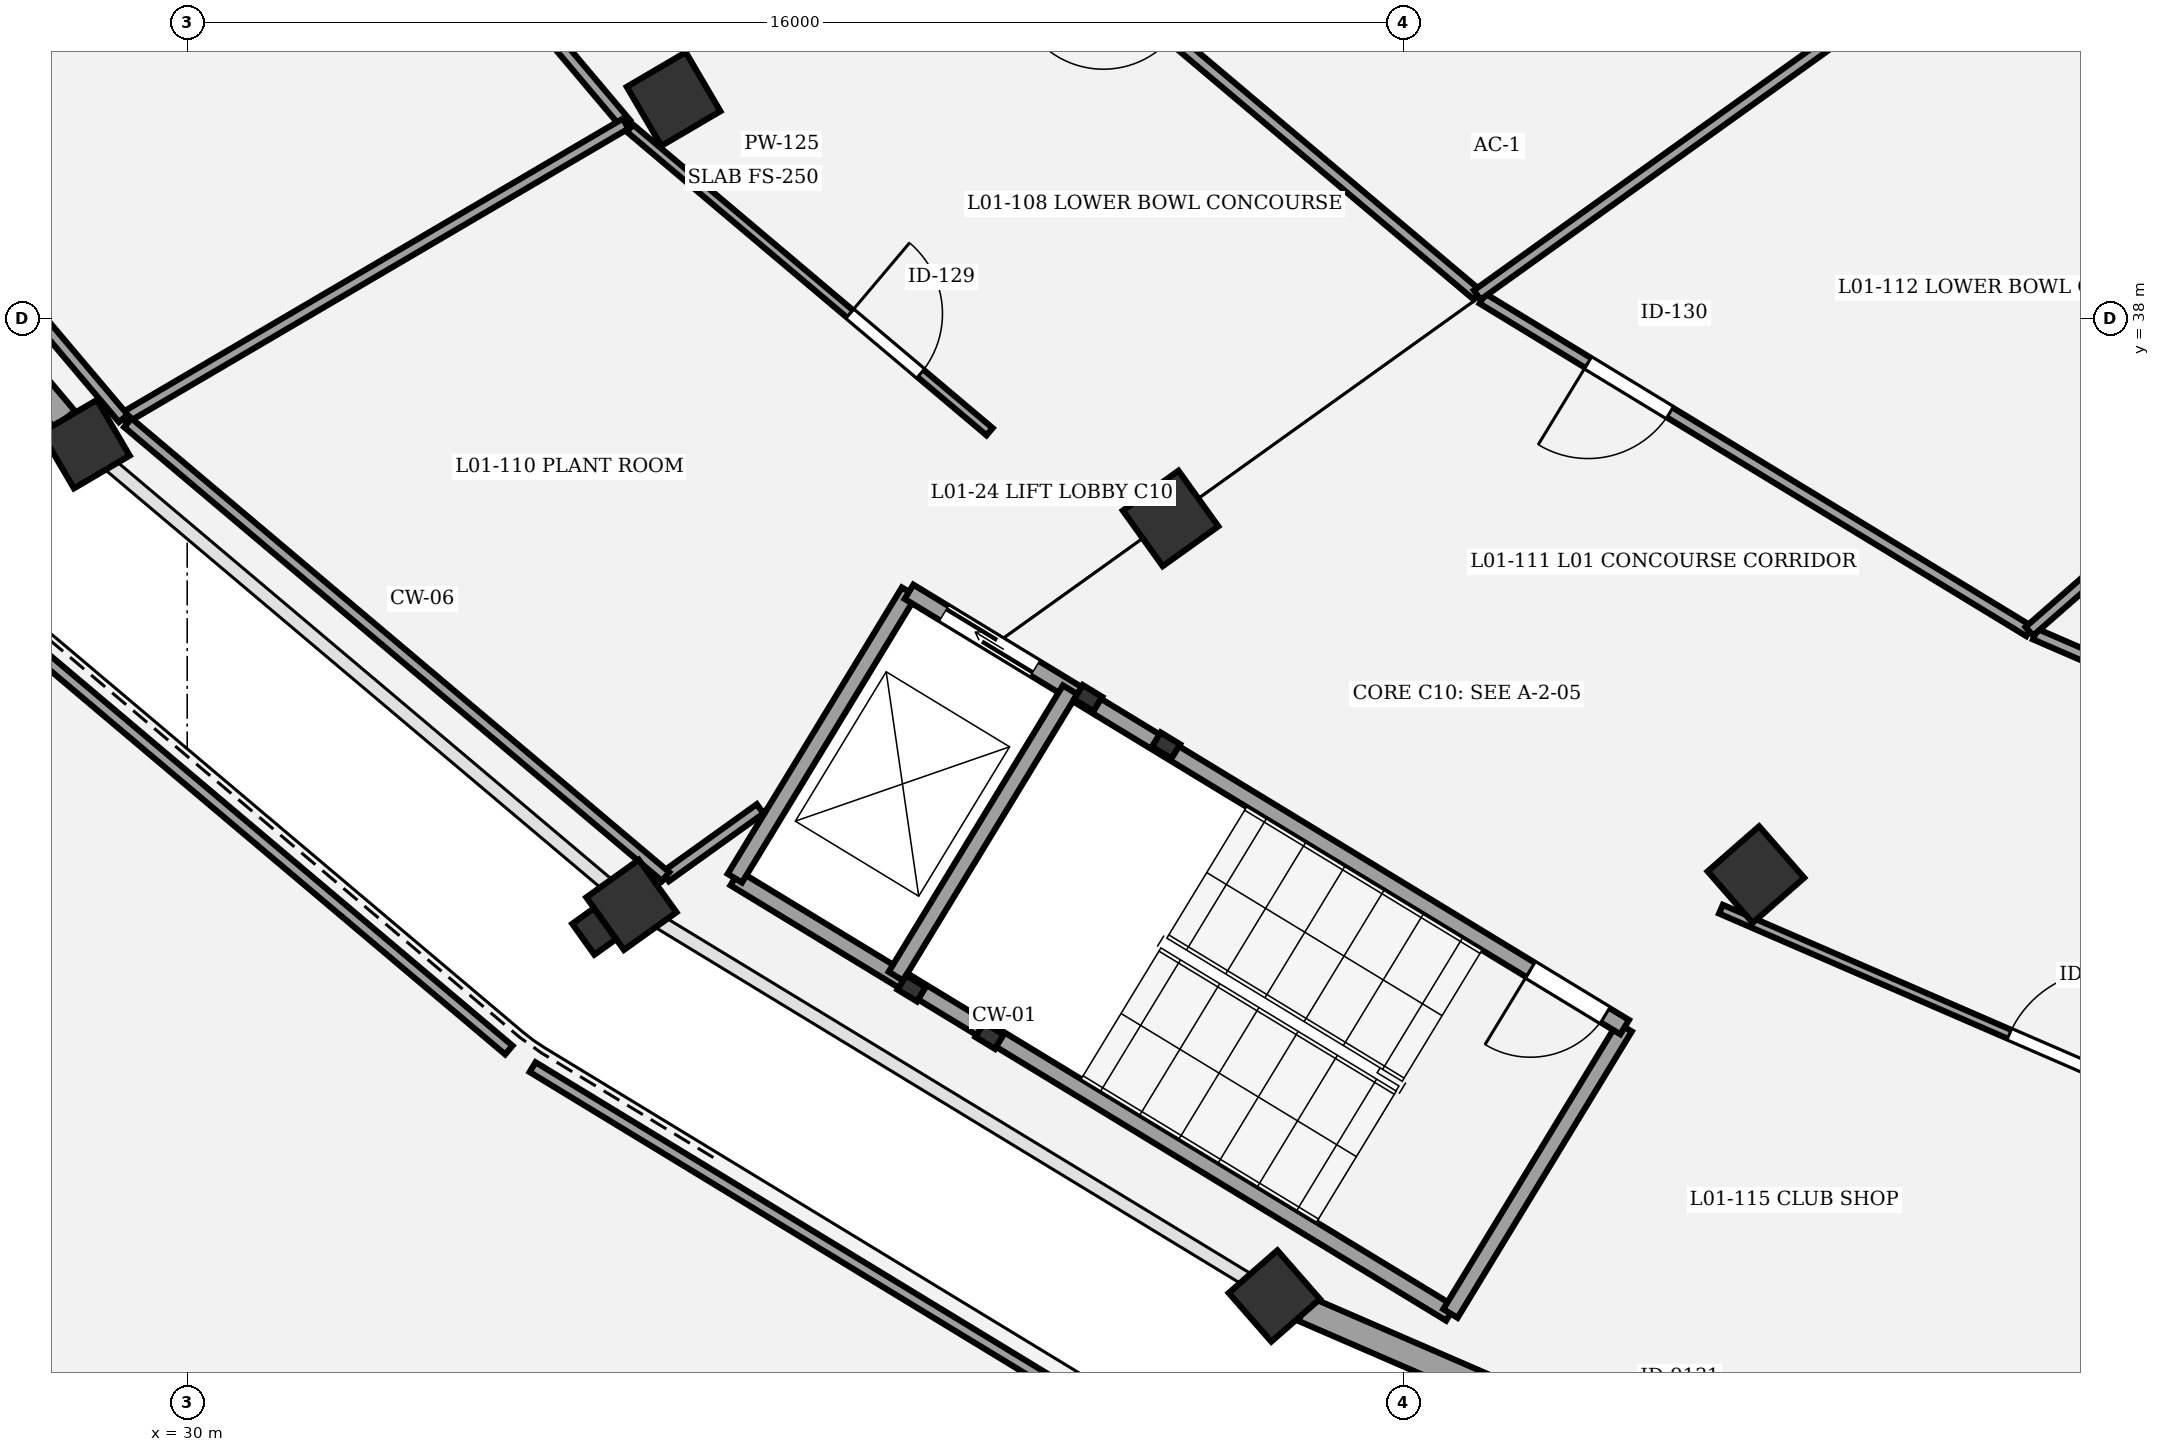
"""IFC4 building model, lengths in metres.
Left out: names, types, materials, properties, quantities, classifications, styles, units other than length and angle.
Written with IfcOpenShell. Run it as: python <this file> out.ifc"""

import sys

from ifc_helpers import new_model, si_unit, direction, frame, frame_2d, origin, origin_2d, place, context, subcontext, project, spatial, rectangle, extrude, element, fill, save


model = new_model("IFC4")
c1 = context("Model", 3, precision=1e-05, world=origin(), true_north=direction((0.0, 1.0)))
c2 = subcontext(c1, "Body", "Model", "MODEL_VIEW")
j1 = project(units=[si_unit("LENGTHUNIT", "METRE"), si_unit("PLANEANGLEUNIT", "RADIAN")], contexts=[c1])
p1 = place(None, origin())
s1 = spatial("IfcSite", under=j1, at=p1, CompositionType="ELEMENT")
p2 = place(p1, origin())
s2 = spatial("IfcBuilding", under=s1, at=p2, CompositionType="ELEMENT")
p3 = place(p2, frame((0.0, 0.0, 5.4)))
s3 = spatial("IfcBuildingStorey", under=s2, at=p3, CompositionType="ELEMENT", Elevation=5.4)
p4 = place(p3, frame((36.4, 40.886, 0.0), z_axis=(0.0, 0.0, 1.0), x_axis=(-0.862513669207, -0.506033764121, 0.0)))
e1 = element("IfcColumn", 1, at=p4, inside=s3, PredefinedType="COLUMN", context=c2, shape_type="SweptSolid", body=[
    extrude(rectangle(XDim=0.9, YDim=0.9, at=origin_2d()), origin(), (0.0, 0.0, 1.0), 4.8),
])
p5 = place(p3, frame((28.662, 36.346, 0.0), z_axis=(0.0, 0.0, 1.0), x_axis=(-0.862513669207, -0.506033764121, 0.0)))
e2 = element("IfcColumn", 2, at=p5, inside=s3, PredefinedType="COLUMN", context=c2, shape_type="SweptSolid", body=[
    extrude(rectangle(XDim=0.85, YDim=0.85, at=origin_2d()), origin(), (0.0, 0.0, 1.0), 4.8),
])
p6 = place(p3, frame((42.939, 35.368, 0.0), z_axis=(0.0, 0.0, 1.0), x_axis=(-0.812897512265, -0.582406760395, 0.0)))
e3 = element("IfcColumn", 3, at=p6, inside=s3, PredefinedType="COLUMN", context=c2, shape_type="SweptSolid", body=[
    extrude(rectangle(XDim=0.9, YDim=0.9, at=origin_2d()), origin(), (0.0, 0.0, 1.0), 4.8),
])
p7 = place(p3, frame((35.844, 30.285, 0.0), z_axis=(0.0, 0.0, 1.0), x_axis=(-0.812897512265, -0.582406760395, 0.0)))
e4 = element("IfcColumn", 4, at=p7, inside=s3, PredefinedType="COLUMN", context=c2, shape_type="SweptSolid", body=[
    extrude(rectangle(XDim=0.85, YDim=0.85, at=origin_2d()), origin(), (0.0, 0.0, 1.0), 4.8),
])
p8 = place(p3, frame((35.354, 29.934, 0.0), z_axis=(0.0, 0.0, 1.0), x_axis=(0.582406760395, -0.812897512265, 0.0)))
e5 = element("IfcColumn", 5, at=p8, inside=s3, PredefinedType="PILASTER", context=c2, shape_type="SweptSolid", body=[
    extrude(rectangle(XDim=0.5, YDim=0.35, at=origin_2d()), origin(), (0.0, 0.0, 1.0), 4.8),
])
p9 = place(p3, frame((50.64, 30.683, 0.0), z_axis=(0.0, 0.0, 1.0), x_axis=(-0.752529860433, -0.658558128912, 0.0)))
e6 = element("IfcColumn", 6, at=p9, inside=s3, PredefinedType="COLUMN", context=c2, shape_type="SweptSolid", body=[
    extrude(rectangle(XDim=0.9, YDim=0.9, at=origin_2d()), origin(), (0.0, 0.0, 1.0), 4.8),
])
p10 = place(p3, frame((44.304, 25.139, 0.0), z_axis=(0.0, 0.0, 1.0), x_axis=(-0.752529860433, -0.658558128912, 0.0)))
e7 = element("IfcColumn", 7, at=p10, inside=s3, PredefinedType="COLUMN", context=c2, shape_type="SweptSolid", body=[
    extrude(rectangle(XDim=0.85, YDim=0.85, at=origin_2d()), origin(), (0.0, 0.0, 1.0), 4.8),
])
p11 = place(p3, frame((23.031, 43.015, 0.0), z_axis=(0.0, 0.0, 1.0), x_axis=(0.645167090332, -0.764041507742, 0.0)))
e8 = element("IfcWall", 8, at=p11, inside=s3, PredefinedType="STANDARD", context=c2, shape_type="SweptSolid", body=[
    extrude(rectangle(XDim=8.305, YDim=0.35, at=frame_2d((4.153, 0.0))), origin(), (0.0, 0.0, 1.0), 3.57),
])
p12 = place(p11, frame((3.253, 0.0, 0.9)))
e9 = element("IfcOpeningElement", 9, at=p12, cuts=e8, PredefinedType="OPENING", context=c2, shape_type="SweptSolid", body=[
    extrude(rectangle(XDim=1.8, YDim=1.75, at=frame_2d((0.9, 0.875))), frame((0.0, 0.185, 0.0), z_axis=(0.0, -1.0, 0.0), x_axis=(1.0, 0.0, 0.0)), (0.0, 0.0, 1.0), 0.37),
])
p13 = place(p3, frame((53.674, 21.077, 0.0), z_axis=(0.0, 0.0, 1.0), x_axis=(-0.91749374913, 0.397750198375, 0.0)))
e10 = element("IfcWall", 10, at=p13, inside=s3, PredefinedType="STANDARD", context=c2, shape_type="SweptSolid", body=[
    extrude(rectangle(XDim=9.79, YDim=0.35, at=frame_2d((4.895, 0.0))), origin(), (0.0, 0.0, 1.0), 3.57),
])
p14 = place(p13, frame((3.995, 0.0, 0.0)))
e11 = element("IfcOpeningElement", 11, at=p14, cuts=e10, PredefinedType="OPENING", context=c2, shape_type="SweptSolid", body=[
    extrude(rectangle(XDim=1.8, YDim=2.4, at=frame_2d((0.9, 1.2))), frame((0.0, 0.185, 0.0), z_axis=(0.0, -1.0, 0.0), x_axis=(1.0, 0.0, 0.0)), (0.0, 0.0, 1.0), 0.37),
])
for number, where, z_axis, x_axis in (
    (12, (42.879, 32.382, 0.0), (0.0, 0.0, 1.0), (-0.854, 0.52, 0.0)),
    (13, (41.854, 33.005, 0.0), (0.0, 0.0, 1.0), (-0.854, 0.52, 0.0)),
    (14, (39.531, 29.186, 0.0), (0.0, 0.0, 1.0), (-0.854, 0.52, 0.0)),
    (15, (40.556, 28.562, 0.0), (0.0, 0.0, 1.0), (-0.854, 0.52, 0.0)),
):
    element("IfcColumn", number, at=place(p3, frame(where, z_axis=z_axis, x_axis=x_axis)), inside=s3, PredefinedType="COLUMN", context=c2, shape_type="SweptSolid", body=[
        extrude(rectangle(XDim=0.3, YDim=0.22, at=origin_2d()), origin(), (0.0, 0.0, 1.0), 4.8),
    ])
p15 = place(p3, frame((46.621, 24.909, 0.0), z_axis=(0.0, 0.0, 1.0), x_axis=(-0.854373055797, 0.519660159651, 0.0)))
e16 = element("IfcWall", 16, at=p15, inside=s3, PredefinedType="SHEAR", context=c2, shape_type="SweptSolid", body=[
    extrude(rectangle(XDim=11.02, YDim=0.22, at=frame_2d((5.51, 0.0))), origin(), (0.0, 0.0, 1.0), 4.55),
])
p16 = place(p3, frame((48.913, 28.677, 0.0), z_axis=(0.0, 0.0, 1.0), x_axis=(-0.519729151243, -0.854331088834, 0.0)))
e17 = element("IfcWall", 17, at=p16, inside=s3, PredefinedType="SHEAR", context=c2, shape_type="SweptSolid", body=[
    extrude(rectangle(XDim=4.41, YDim=0.22, at=frame_2d((2.205, 0.0))), origin(), (0.0, 0.0, 1.0), 4.55),
])
p17 = place(p3, frame((39.497, 34.403, 0.0), z_axis=(0.0, 0.0, 1.0), x_axis=(-0.519664162523, -0.854370621095, 0.0)))
e18 = element("IfcWall", 18, at=p17, inside=s3, PredefinedType="SHEAR", context=c2, shape_type="SweptSolid", body=[
    extrude(rectangle(XDim=4.41, YDim=0.22, at=frame_2d((2.205, 0.0))), origin(), (0.0, 0.0, 1.0), 4.55),
])
p18 = place(p3, frame((48.913, 28.677, 0.0), z_axis=(0.0, 0.0, 1.0), x_axis=(-0.854369202373, 0.51966649501, 0.0)))
e19 = element("IfcWall", 19, at=p18, inside=s3, PredefinedType="SHEAR", context=c2, shape_type="SweptSolid", body=[
    extrude(rectangle(XDim=11.02, YDim=0.22, at=frame_2d((5.51, 0.0))), origin(), (0.0, 0.0, 1.0), 4.55),
])
p19 = place(p18, frame((0.3, 0.0, 0.0)))
e20 = element("IfcOpeningElement", 20, at=p19, cuts=e19, PredefinedType="OPENING", context=c2, shape_type="SweptSolid", body=[
    extrude(rectangle(XDim=1.15, YDim=2.15, at=frame_2d((0.575, 1.075))), frame((0.0, 0.12, 0.0), z_axis=(0.0, -1.0, 0.0), x_axis=(1.0, 0.0, 0.0)), (0.0, 0.0, 1.0), 0.24),
])
p20 = place(p18, frame((9.08, 0.0, 0.0)))
e21 = element("IfcOpeningElement", 21, at=p20, cuts=e19, PredefinedType="OPENING", context=c2, shape_type="SweptSolid", body=[
    extrude(rectangle(XDim=1.4, YDim=2.25, at=frame_2d((0.7, 1.125))), frame((0.0, 0.12, 0.0), z_axis=(0.0, -1.0, 0.0), x_axis=(1.0, 0.0, 0.0)), (0.0, 0.0, 1.0), 0.24),
])
p21 = place(p3, frame((41.616, 33.115, 0.0), z_axis=(0.0, 0.0, 1.0), x_axis=(-0.519664162523, -0.854370621095, 0.0)))
e22 = element("IfcWall", 22, at=p21, inside=s3, PredefinedType="SHEAR", context=c2, shape_type="SweptSolid", body=[
    extrude(rectangle(XDim=4.41, YDim=0.22, at=frame_2d((2.205, 0.0))), origin(), (0.0, 0.0, 1.0), 4.55),
])
p22 = place(p3, frame((30.405, 46.914, 0.0), z_axis=(0.0, 0.0, 1.0), x_axis=(0.64516519871, -0.76404310505, 0.0)))
e23 = element("IfcWall", 23, at=p22, inside=s3, PredefinedType="PARTITIONING", context=c2, shape_type="SweptSolid", body=[
    extrude(rectangle(XDim=8.313, YDim=0.15, at=frame_2d((4.157, 0.0))), origin(), (0.0, 0.0, 1.0), 3.55),
])
p23 = place(p22, frame((3.587, 0.0, 0.0)))
e24 = element("IfcOpeningElement", 24, at=p23, cuts=e23, PredefinedType="OPENING", context=c2, shape_type="SweptSolid", body=[
    extrude(rectangle(XDim=1.14, YDim=2.2, at=frame_2d((0.57, 1.1))), frame((0.0, 0.085, 0.0), z_axis=(0.0, -1.0, 0.0), x_axis=(1.0, 0.0, 0.0)), (0.0, 0.0, 1.0), 0.17),
])
p24 = place(p3, frame((46.973, 38.308, 0.0), z_axis=(0.0, 0.0, 1.0), x_axis=(-0.764249122867, 0.644921141068, 0.0)))
e25 = element("IfcWall", 25, at=p24, inside=s3, PredefinedType="PARTITIONING", context=c2, shape_type="SweptSolid", body=[
    extrude(rectangle(XDim=7.99, YDim=0.15, at=frame_2d((3.995, 0.0))), origin(), (0.0, 0.0, 1.0), 3.55),
])
p25 = place(p24, frame((5.256, 0.0, 0.0)))
e26 = element("IfcOpeningElement", 26, at=p25, cuts=e25, PredefinedType="OPENING", context=c2, shape_type="SweptSolid", body=[
    extrude(rectangle(XDim=1.18, YDim=2.2, at=frame_2d((0.59, 1.1))), frame((0.0, 0.085, 0.0), z_axis=(0.0, -1.0, 0.0), x_axis=(1.0, 0.0, 0.0)), (0.0, 0.0, 1.0), 0.17),
])
p26 = place(p3, frame((35.825, 40.503, 0.0), z_axis=(0.0, 0.0, 1.0), x_axis=(0.764269616674, -0.644896854565, 0.0)))
e27 = element("IfcWall", 27, at=p26, inside=s3, PredefinedType="PARTITIONING", context=c2, shape_type="SweptSolid", body=[
    extrude(rectangle(XDim=6.191, YDim=0.125, at=frame_2d((3.095, 0.0))), origin(), (0.0, 0.0, 1.0), 3.55),
])
p27 = place(p26, frame((3.785, 0.0, 0.0)))
e28 = element("IfcOpeningElement", 28, at=p27, cuts=e27, PredefinedType="OPENING", context=c2, shape_type="SweptSolid", body=[
    extrude(rectangle(XDim=1.22, YDim=2.2, at=frame_2d((0.61, 1.1))), frame((0.0, 0.073, 0.0), z_axis=(0.0, -1.0, 0.0), x_axis=(1.0, 0.0, 0.0)), (0.0, 0.0, 1.0), 0.145),
])
p28 = place(p3, frame((54.237, 33.884, 0.0), z_axis=(0.0, 0.0, 1.0), x_axis=(-0.854330104408, 0.519730769439, 0.0)))
e29 = element("IfcWall", 29, at=p28, inside=s3, PredefinedType="PARTITIONING", context=c2, shape_type="SweptSolid", body=[
    extrude(rectangle(XDim=8.42, YDim=0.15, at=frame_2d((4.21, 0.0))), origin(), (0.0, 0.0, 1.0), 3.55),
])
p29 = place(p28, frame((5.536, 0.0, 0.0)))
e30 = element("IfcOpeningElement", 30, at=p29, cuts=e29, PredefinedType="OPENING", context=c2, shape_type="SweptSolid", body=[
    extrude(rectangle(XDim=1.26, YDim=2.2, at=frame_2d((0.63, 1.1))), frame((0.0, 0.085, 0.0), z_axis=(0.0, -1.0, 0.0), x_axis=(1.0, 0.0, 0.0)), (0.0, 0.0, 1.0), 0.17),
])
p30 = place(p3, frame((62.618, 30.247, 0.0), z_axis=(0.0, 0.0, 1.0), x_axis=(-0.917494590455, 0.397748257677, 0.0)))
e31 = element("IfcWall", 31, at=p30, inside=s3, PredefinedType="PARTITIONING", context=c2, shape_type="SweptSolid", body=[
    extrude(rectangle(XDim=9.049, YDim=0.15, at=frame_2d((4.525, 0.0))), origin(), (0.0, 0.0, 1.0), 3.55),
])
p31 = place(p30, frame((5.991, 0.0, 0.0)))
e32 = element("IfcOpeningElement", 32, at=p31, cuts=e31, PredefinedType="OPENING", context=c2, shape_type="SweptSolid", body=[
    extrude(rectangle(XDim=1.32, YDim=2.2, at=frame_2d((0.66, 1.1))), frame((0.0, 0.085, 0.0), z_axis=(0.0, -1.0, 0.0), x_axis=(1.0, 0.0, 0.0)), (0.0, 0.0, 1.0), 0.17),
])
p32 = place(p3, frame((50.18, 30.228, 0.0), z_axis=(0.0, 0.0, 1.0), x_axis=(0.917508957037, -0.39771511633, 0.0)))
e33 = element("IfcWall", 33, at=p32, inside=s3, PredefinedType="PARTITIONING", context=c2, shape_type="SweptSolid", body=[
    extrude(rectangle(XDim=9.671, YDim=0.125, at=frame_2d((4.836, 0.0))), origin(), (0.0, 0.0, 1.0), 3.55),
])
p33 = place(p32, frame((4.136, 0.0, 0.0)))
e34 = element("IfcOpeningElement", 34, at=p33, cuts=e33, PredefinedType="OPENING", context=c2, shape_type="SweptSolid", body=[
    extrude(rectangle(XDim=1.4, YDim=2.2, at=frame_2d((0.7, 1.1))), frame((0.0, 0.073, 0.0), z_axis=(0.0, -1.0, 0.0), x_axis=(1.0, 0.0, 0.0)), (0.0, 0.0, 1.0), 0.145),
])
p34 = place(p3, frame((35.768, 40.562, 0.0), z_axis=(0.0, 0.0, 1.0), x_axis=(-0.862520085009, -0.506022828492, 0.0)))
e35 = element("IfcWall", 35, at=p34, inside=s3, PredefinedType="PARTITIONING", context=c2, shape_type="SweptSolid", body=[
    extrude(rectangle(XDim=7.663, YDim=0.15, at=frame_2d((3.831, 0.0))), origin(), (0.0, 0.0, 1.0), 3.55),
])
p35 = place(p3, frame((29.159, 36.685, 0.0), z_axis=(0.0, 0.0, 1.0), x_axis=(-0.645166061073, 0.764042376861, 0.0)))
e36 = element("IfcWall", 36, at=p35, inside=s3, PredefinedType="PARTITIONING", context=c2, shape_type="SweptSolid", body=[
    extrude(rectangle(XDim=9.014, YDim=0.15, at=frame_2d((4.507, 0.0))), origin(), (0.0, 0.0, 1.0), 3.55),
])
p36 = place(p3, frame((54.0, 43.343, 0.0), z_axis=(0.0, 0.0, 1.0), x_axis=(-0.812881530735, -0.582429066058, 0.0)))
e37 = element("IfcWall", 37, at=p36, inside=s3, PredefinedType="PARTITIONING", context=c2, shape_type="SweptSolid", body=[
    extrude(rectangle(XDim=8.645, YDim=0.15, at=frame_2d((4.322, 0.0))), origin(), (0.0, 0.0, 1.0), 3.55),
])
p37 = place(p3, frame((37.538, 31.548, 0.0), z_axis=(0.0, 0.0, 1.0), x_axis=(-0.812848600764, -0.582475022844, 0.0)))
e38 = element("IfcWall", 38, at=p37, inside=s3, PredefinedType="PARTITIONING", context=c2, shape_type="SweptSolid", body=[
    extrude(rectangle(XDim=1.53, YDim=0.15, at=frame_2d((0.765, 0.0))), origin(), (0.0, 0.0, 1.0), 3.55),
])
p38 = place(p3, frame((36.294, 30.657, 0.0), z_axis=(0.0, 0.0, 1.0), x_axis=(-0.764252893528, 0.644916672706, 0.0)))
e39 = element("IfcWall", 39, at=p38, inside=s3, PredefinedType="PARTITIONING", context=c2, shape_type="SweptSolid", body=[
    extrude(rectangle(XDim=9.257, YDim=0.15, at=frame_2d((4.629, 0.0))), origin(), (0.0, 0.0, 1.0), 3.55),
])
p39 = place(p3, frame((54.067, 43.292, 0.0), z_axis=(0.0, 0.0, 1.0), x_axis=(0.854343551339, -0.519708664817, 0.0)))
e40 = element("IfcWall", 40, at=p39, inside=s3, PredefinedType="PARTITIONING", context=c2, shape_type="SweptSolid", body=[
    extrude(rectangle(XDim=7.542, YDim=0.15, at=frame_2d((3.771, 0.0))), origin(), (0.0, 0.0, 1.0), 3.55),
])
p40 = place(p3, frame((60.51, 39.373, 0.0), z_axis=(0.0, 0.0, 1.0), x_axis=(-0.752565808221, -0.658517049359, 0.0)))
e41 = element("IfcWall", 41, at=p40, inside=s3, PredefinedType="PARTITIONING", context=c2, shape_type="SweptSolid", body=[
    extrude(rectangle(XDim=8.335, YDim=0.15, at=frame_2d((4.168, 0.0))), origin(), (0.0, 0.0, 1.0), 3.55),
])
p41 = place(p3, frame((59.054, 26.381, 0.0), z_axis=(0.0, 0.0, 1.0), x_axis=(-0.677844539823, -0.735205263741, 0.0)))
e42 = element("IfcWall", 42, at=p41, inside=s3, PredefinedType="PARTITIONING", context=c2, shape_type="SweptSolid", body=[
    extrude(rectangle(XDim=6.87, YDim=0.15, at=frame_2d((3.435, 0.0))), origin(), (0.0, 0.0, 1.0), 3.55),
])
p42 = place(p3, frame((27.049, 34.436, 0.0), z_axis=(0.0, 0.0, 1.0), x_axis=(0.76426547638, -0.644901761212, 0.0)))
e43 = element("IfcWall", 43, at=p42, inside=s3, PredefinedType="PARTITIONING", context=c2, shape_type="SweptSolid", body=[
    extrude(rectangle(XDim=9.398, YDim=0.15, at=frame_2d((4.699, 0.0))), origin(), (0.0, 0.0, 1.0), 3.55),
])
p43 = place(p3, frame((34.545, 28.15, 0.0), z_axis=(0.0, 0.0, 1.0), x_axis=(0.854333268174, -0.519725568826, 0.0)))
e44 = element("IfcWall", 44, at=p43, inside=s3, PredefinedType="PARTITIONING", context=c2, shape_type="SweptSolid", body=[
    extrude(rectangle(XDim=9.902, YDim=0.15, at=frame_2d((4.951, 0.0))), origin(), (0.0, 0.0, 1.0), 3.55),
])
p44 = place(p19, origin())
e45 = element("IfcDoor", 45, at=p44, inside=s3, OperationType="SINGLE_SWING_RIGHT", PredefinedType="DOOR", context=c2, shape_type="SweptSolid", body=[
    extrude(rectangle(XDim=1.15, YDim=2.15, at=frame_2d((0.575, 1.075))), frame((0.0, 0.025, 0.0), z_axis=(0.0, -1.0, 0.0), x_axis=(1.0, 0.0, 0.0)), (0.0, 0.0, 1.0), 0.05),
])
fill(e20, e45)
p45 = place(p20, origin())
e46 = element("IfcDoor", 46, at=p45, inside=s3, OperationType="DOUBLE_DOOR_SLIDING", PredefinedType="DOOR", context=c2, shape_type="SweptSolid", body=[
    extrude(rectangle(XDim=1.4, YDim=2.25, at=frame_2d((0.7, 1.125))), frame((0.0, 0.025, 0.0), z_axis=(0.0, -1.0, 0.0), x_axis=(1.0, 0.0, 0.0)), (0.0, 0.0, 1.0), 0.05),
])
fill(e21, e46)
p46 = place(p27, origin())
e47 = element("IfcDoor", 47, at=p46, inside=s3, OperationType="SINGLE_SWING_LEFT", PredefinedType="DOOR", context=c2, shape_type="SweptSolid", body=[
    extrude(rectangle(XDim=1.22, YDim=2.2, at=frame_2d((0.61, 1.1))), frame((0.0, 0.025, 0.0), z_axis=(0.0, -1.0, 0.0), x_axis=(1.0, 0.0, 0.0)), (0.0, 0.0, 1.0), 0.05),
])
fill(e28, e47)
p47 = place(p29, origin())
e48 = element("IfcDoor", 48, at=p47, inside=s3, OperationType="SINGLE_SWING_RIGHT", PredefinedType="DOOR", context=c2, shape_type="SweptSolid", body=[
    extrude(rectangle(XDim=1.26, YDim=2.2, at=frame_2d((0.63, 1.1))), frame((0.0, 0.025, 0.0), z_axis=(0.0, -1.0, 0.0), x_axis=(1.0, 0.0, 0.0)), (0.0, 0.0, 1.0), 0.05),
])
fill(e30, e48)
p48 = place(p33, origin())
e49 = element("IfcDoor", 49, at=p48, inside=s3, OperationType="SINGLE_SWING_RIGHT", PredefinedType="DOOR", context=c2, shape_type="SweptSolid", body=[
    extrude(rectangle(XDim=1.4, YDim=2.2, at=frame_2d((0.7, 1.1))), frame((0.0, 0.025, 0.0), z_axis=(0.0, -1.0, 0.0), x_axis=(1.0, 0.0, 0.0)), (0.0, 0.0, 1.0), 0.05),
])
fill(e34, e49)
save(model, sys.argv[1])
